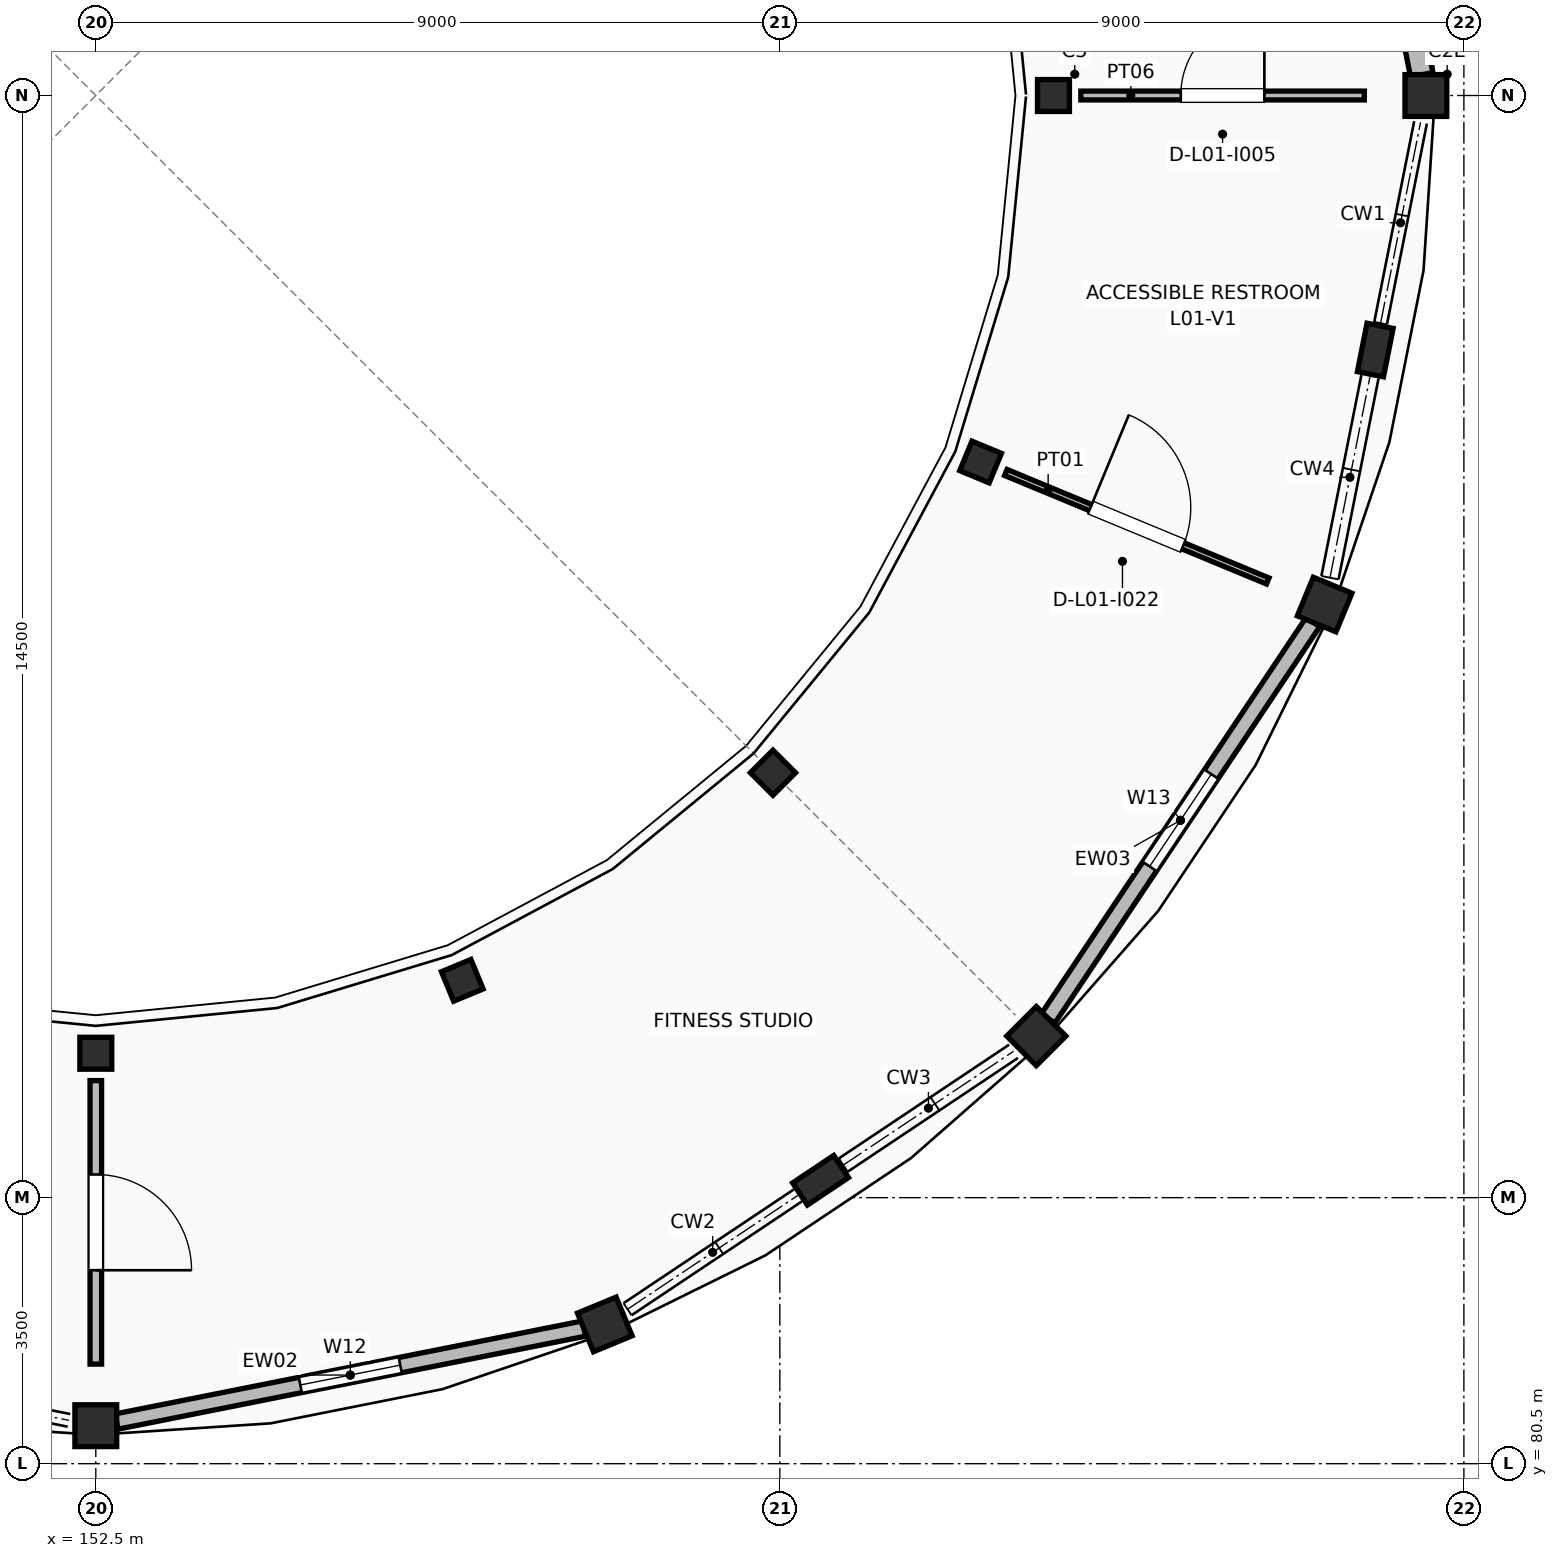
"""IFC4 building model, lengths in metres.
Left out: names, types, materials, properties, quantities, classifications, styles, units other than length and angle.
Written with IfcOpenShell. Run it as: python <this file> out.ifc"""

import sys

from ifc_helpers import new_model, si_unit, direction, frame, frame_2d, origin, origin_2d, place, context, subcontext, project, spatial, rectangle, extrude, element, fill, save


model = new_model("IFC4")
c1 = context("Model", 3, precision=1e-05, world=origin(), true_north=direction((0.0, 1.0)))
c2 = subcontext(c1, "Body", "Model", "MODEL_VIEW")
j1 = project(units=[si_unit("LENGTHUNIT", "METRE"), si_unit("PLANEANGLEUNIT", "RADIAN")], contexts=[c1])
p1 = place(None, origin())
s1 = spatial("IfcSite", under=j1, at=p1, CompositionType="ELEMENT")
p2 = place(p1, origin())
s2 = spatial("IfcBuilding", under=s1, at=p2, CompositionType="ELEMENT")
p3 = place(p2, frame((0.0, 0.0, 4.42)))
s3 = spatial("IfcBuildingStorey", under=s2, at=p3, CompositionType="ELEMENT", Elevation=4.42)
p4 = place(p3, frame((165.1, 98.5, 0.0), z_axis=(0.0, 0.0, 1.0), x_axis=(1.0, 0.0, 0.0)))
e1 = element("IfcColumn", 1, at=p4, inside=s3, PredefinedType="COLUMN", context=c2, shape_type="SweptSolid", body=[
    extrude(rectangle(XDim=0.42, YDim=0.42, at=origin_2d()), origin(), (0.0, 0.0, 1.0), 3.74),
])
p5 = place(p3, frame((170.0, 98.5, 0.0), z_axis=(0.0, 0.0, 1.0), x_axis=(1.0, 0.0, 0.0)))
e2 = element("IfcColumn", 2, at=p5, inside=s3, PredefinedType="COLUMN", context=c2, shape_type="SweptSolid", body=[
    extrude(rectangle(XDim=0.55, YDim=0.55, at=origin_2d()), origin(), (0.0, 0.0, 1.0), 3.74),
])
p6 = place(p3, frame((152.5, 85.9, 0.0), z_axis=(0.0, 0.0, 1.0), x_axis=(0.0, -1.0, 0.0)))
e3 = element("IfcColumn", 3, at=p6, inside=s3, PredefinedType="COLUMN", context=c2, shape_type="SweptSolid", body=[
    extrude(rectangle(XDim=0.42, YDim=0.42, at=origin_2d()), origin(), (0.0, 0.0, 1.0), 3.74),
])
p7 = place(p3, frame((152.5, 81.0, 0.0), z_axis=(0.0, 0.0, 1.0), x_axis=(0.0, -1.0, 0.0)))
e4 = element("IfcColumn", 4, at=p7, inside=s3, PredefinedType="COLUMN", context=c2, shape_type="SweptSolid", body=[
    extrude(rectangle(XDim=0.55, YDim=0.55, at=origin_2d()), origin(), (0.0, 0.0, 1.0), 3.74),
])
p8 = place(p3, frame((157.322, 86.859, 0.0), z_axis=(0.0, 0.0, 1.0), x_axis=(0.382683432365, -0.923879532511, 0.0)))
e5 = element("IfcColumn", 5, at=p8, inside=s3, PredefinedType="COLUMN", context=c2, shape_type="SweptSolid", body=[
    extrude(rectangle(XDim=0.42, YDim=0.42, at=origin_2d()), origin(), (0.0, 0.0, 1.0), 3.74),
])
p9 = place(p3, frame((159.197, 82.332, 0.0), z_axis=(0.0, 0.0, 1.0), x_axis=(0.382683432365, -0.923879532511, 0.0)))
e6 = element("IfcColumn", 6, at=p9, inside=s3, PredefinedType="COLUMN", context=c2, shape_type="SweptSolid", body=[
    extrude(rectangle(XDim=0.55, YDim=0.55, at=origin_2d()), origin(), (0.0, 0.0, 1.0), 3.74),
])
p10 = place(p3, frame((161.409, 89.591, 0.0), z_axis=(0.0, 0.0, 1.0), x_axis=(0.707106781187, -0.707106781187, 0.0)))
e7 = element("IfcColumn", 7, at=p10, inside=s3, PredefinedType="COLUMN", context=c2, shape_type="SweptSolid", body=[
    extrude(rectangle(XDim=0.42, YDim=0.42, at=origin_2d()), origin(), (0.0, 0.0, 1.0), 3.74),
])
p11 = place(p3, frame((164.874, 86.126, 0.0), z_axis=(0.0, 0.0, 1.0), x_axis=(0.707106781187, -0.707106781187, 0.0)))
e8 = element("IfcColumn", 8, at=p11, inside=s3, PredefinedType="COLUMN", context=c2, shape_type="SweptSolid", body=[
    extrude(rectangle(XDim=0.55, YDim=0.55, at=origin_2d()), origin(), (0.0, 0.0, 1.0), 3.74),
])
p12 = place(p3, frame((164.141, 93.678, 0.0), z_axis=(0.0, 0.0, 1.0), x_axis=(0.923879532511, -0.382683432365, 0.0)))
e9 = element("IfcColumn", 9, at=p12, inside=s3, PredefinedType="COLUMN", context=c2, shape_type="SweptSolid", body=[
    extrude(rectangle(XDim=0.42, YDim=0.42, at=origin_2d()), origin(), (0.0, 0.0, 1.0), 3.74),
])
p13 = place(p3, frame((168.668, 91.803, 0.0), z_axis=(0.0, 0.0, 1.0), x_axis=(0.923879532511, -0.382683432365, 0.0)))
e10 = element("IfcColumn", 10, at=p13, inside=s3, PredefinedType="COLUMN", context=c2, shape_type="SweptSolid", body=[
    extrude(rectangle(XDim=0.55, YDim=0.55, at=origin_2d()), origin(), (0.0, 0.0, 1.0), 3.74),
])
for number, where, z_axis, x_axis in (
    (11, (162.036, 84.229, 0.0), (0.0, 0.0, 1.0), (0.556, -0.831, 0.0)),
    (12, (169.334, 95.152, 0.0), (0.0, 0.0, 1.0), (0.981, -0.195, 0.0)),
):
    element("IfcColumn", number, at=place(p3, frame(where, z_axis=z_axis, x_axis=x_axis)), inside=s3, PredefinedType="PILASTER", context=c2, shape_type="SweptSolid", body=[
        extrude(rectangle(XDim=0.35, YDim=0.65, at=origin_2d()), origin(), (0.0, 0.0, 1.0), 3.74),
    ])
p14 = place(p3, frame((169.946, 98.773, 0.0), z_axis=(0.0, 0.0, 1.0), x_axis=(-0.195090512195, 0.980785242574, 0.0)))
e13 = element("IfcWall", 13, at=p14, inside=s3, PredefinedType="STANDARD", context=c2, shape_type="SweptSolid", body=[
    extrude(rectangle(XDim=6.272, YDim=0.3, at=frame_2d((3.136, 0.0))), origin(), (0.0, 0.0, 1.0), 2.78),
])
p15 = place(p14, frame((2.526, 0.0, 0.95)))
e14 = element("IfcOpeningElement", 14, at=p15, cuts=e13, PredefinedType="OPENING", context=c2, shape_type="SweptSolid", body=[
    extrude(rectangle(XDim=1.22, YDim=1.3, at=frame_2d((0.61, 0.65))), frame((0.0, 0.16, 0.0), z_axis=(0.0, -1.0, 0.0), x_axis=(1.0, 0.0, 0.0)), (0.0, 0.0, 1.0), 0.32),
])
p16 = place(p3, frame((152.773, 81.054, 0.0), z_axis=(0.0, 0.0, 1.0), x_axis=(0.980785242574, 0.195090512195, 0.0)))
e15 = element("IfcWall", 15, at=p16, inside=s3, PredefinedType="STANDARD", context=c2, shape_type="SweptSolid", body=[
    extrude(rectangle(XDim=6.272, YDim=0.204, at=frame_2d((3.136, 0.0))), origin(), (0.0, 0.0, 1.0), 2.78),
])
p17 = place(p16, frame((2.466, 0.0, 0.95)))
e16 = element("IfcOpeningElement", 16, at=p17, cuts=e15, PredefinedType="OPENING", context=c2, shape_type="SweptSolid", body=[
    extrude(rectangle(XDim=1.34, YDim=1.6, at=frame_2d((0.67, 0.8))), frame((0.0, 0.112, 0.0), z_axis=(0.0, -1.0, 0.0), x_axis=(1.0, 0.0, 0.0)), (0.0, 0.0, 1.0), 0.224),
])
p18 = place(p3, frame((165.029, 86.357, 0.0), z_axis=(0.0, 0.0, 1.0), x_axis=(0.555571204893, 0.831468962917, 0.0)))
e17 = element("IfcWall", 17, at=p18, inside=s3, PredefinedType="STANDARD", context=c2, shape_type="SweptSolid", body=[
    extrude(rectangle(XDim=6.272, YDim=0.216, at=frame_2d((3.136, 0.0))), origin(), (0.0, 0.0, 1.0), 2.78),
])
p19 = place(p18, frame((2.406, 0.0, 0.95)))
e18 = element("IfcOpeningElement", 18, at=p19, cuts=e17, PredefinedType="OPENING", context=c2, shape_type="SweptSolid", body=[
    extrude(rectangle(XDim=1.46, YDim=1.15, at=frame_2d((0.73, 0.575))), frame((0.0, 0.118, 0.0), z_axis=(0.0, -1.0, 0.0), x_axis=(1.0, 0.0, 0.0)), (0.0, 0.0, 1.0), 0.236),
])
p20 = place(p3, frame((165.46, 98.5, 0.0), z_axis=(0.0, 0.0, 1.0), x_axis=(1.0, 0.0, 0.0)))
e19 = element("IfcWall", 19, at=p20, inside=s3, PredefinedType="PARTITIONING", context=c2, shape_type="SweptSolid", body=[
    extrude(rectangle(XDim=3.73, YDim=0.116, at=frame_2d((1.865, 0.0))), origin(), (0.0, 0.0, 1.0), 2.75),
])
p21 = place(p20, frame((1.315, 0.0, 0.0)))
e20 = element("IfcOpeningElement", 20, at=p21, cuts=e19, PredefinedType="OPENING", context=c2, shape_type="SweptSolid", body=[
    extrude(rectangle(XDim=1.1, YDim=2.12, at=frame_2d((0.55, 1.06))), frame((0.0, 0.068, 0.0), z_axis=(0.0, -1.0, 0.0), x_axis=(1.0, 0.0, 0.0)), (0.0, 0.0, 1.0), 0.136),
])
p22 = place(p3, frame((152.5, 85.54, 0.0), z_axis=(0.0, 0.0, 1.0), x_axis=(0.0, -1.0, 0.0)))
e21 = element("IfcWall", 21, at=p22, inside=s3, PredefinedType="PARTITIONING", context=c2, shape_type="SweptSolid", body=[
    extrude(rectangle(XDim=3.73, YDim=0.152, at=frame_2d((1.865, 0.0))), origin(), (0.0, 0.0, 1.0), 2.75),
])
p23 = place(p22, frame((1.235, 0.0, 0.0)))
e22 = element("IfcOpeningElement", 22, at=p23, cuts=e21, PredefinedType="OPENING", context=c2, shape_type="SweptSolid", body=[
    extrude(rectangle(XDim=1.26, YDim=2.24, at=frame_2d((0.63, 1.12))), frame((0.0, 0.086, 0.0), z_axis=(0.0, -1.0, 0.0), x_axis=(1.0, 0.0, 0.0)), (0.0, 0.0, 1.0), 0.172),
])
p24 = place(p3, frame((164.473, 93.541, 0.0), z_axis=(0.0, 0.0, 1.0), x_axis=(0.923870841209, -0.38270441435, 0.0)))
e23 = element("IfcWall", 23, at=p24, inside=s3, PredefinedType="PARTITIONING", context=c2, shape_type="SweptSolid", body=[
    extrude(rectangle(XDim=3.73, YDim=0.086, at=frame_2d((1.865, 0.0))), origin(), (0.0, 0.0, 1.0), 2.75),
])
p25 = place(p24, frame((1.205, 0.0, 0.0)))
e24 = element("IfcOpeningElement", 24, at=p25, cuts=e23, PredefinedType="OPENING", context=c2, shape_type="SweptSolid", body=[
    extrude(rectangle(XDim=1.32, YDim=2.18, at=frame_2d((0.66, 1.09))), frame((0.0, 0.053, 0.0), z_axis=(0.0, -1.0, 0.0), x_axis=(1.0, 0.0, 0.0)), (0.0, 0.0, 1.0), 0.106),
])
p26 = place(p17, origin())
e25 = element("IfcWindow", 25, at=p26, inside=s3, PartitioningType="SINGLE_PANEL", PredefinedType="WINDOW", context=c2, shape_type="SweptSolid", body=[
    extrude(rectangle(XDim=1.34, YDim=1.6, at=frame_2d((0.67, 0.8))), frame((0.0, 0.03, 0.0), z_axis=(0.0, -1.0, 0.0), x_axis=(1.0, 0.0, 0.0)), (0.0, 0.0, 1.0), 0.06),
])
fill(e16, e25)
p27 = place(p19, origin())
e26 = element("IfcWindow", 26, at=p27, inside=s3, PartitioningType="SINGLE_PANEL", PredefinedType="WINDOW", context=c2, shape_type="SweptSolid", body=[
    extrude(rectangle(XDim=1.46, YDim=1.15, at=frame_2d((0.73, 0.575))), frame((0.0, 0.03, 0.0), z_axis=(0.0, -1.0, 0.0), x_axis=(1.0, 0.0, 0.0)), (0.0, 0.0, 1.0), 0.06),
])
fill(e18, e26)
p28 = place(p21, frame((1.1, 0.0, 0.0), z_axis=(0.0, 0.0, 1.0), x_axis=(-1.0, 0.0, 0.0)))
e27 = element("IfcDoor", 27, at=p28, inside=s3, OperationType="SINGLE_SWING_RIGHT", PredefinedType="DOOR", context=c2, shape_type="SweptSolid", body=[
    extrude(rectangle(XDim=1.1, YDim=2.12, at=frame_2d((0.55, 1.06))), frame((0.0, 0.025, 0.0), z_axis=(0.0, -1.0, 0.0), x_axis=(1.0, 0.0, 0.0)), (0.0, 0.0, 1.0), 0.05),
])
fill(e20, e27)
p29 = place(p23, frame((1.26, 0.0, 0.0), z_axis=(0.0, 0.0, 1.0), x_axis=(-1.0, 0.0, 0.0)))
e28 = element("IfcDoor", 28, at=p29, inside=s3, OperationType="SINGLE_SWING_RIGHT", PredefinedType="DOOR", context=c2, shape_type="SweptSolid", body=[
    extrude(rectangle(XDim=1.26, YDim=2.24, at=frame_2d((0.63, 1.12))), frame((0.0, 0.025, 0.0), z_axis=(0.0, -1.0, 0.0), x_axis=(1.0, 0.0, 0.0)), (0.0, 0.0, 1.0), 0.05),
])
fill(e22, e28)
p30 = place(p25, origin())
e29 = element("IfcDoor", 29, at=p30, inside=s3, OperationType="SINGLE_SWING_LEFT", PredefinedType="DOOR", context=c2, shape_type="SweptSolid", body=[
    extrude(rectangle(XDim=1.32, YDim=2.18, at=frame_2d((0.66, 1.09))), frame((0.0, 0.025, 0.0), z_axis=(0.0, -1.0, 0.0), x_axis=(1.0, 0.0, 0.0)), (0.0, 0.0, 1.0), 0.05),
])
fill(e24, e29)
save(model, sys.argv[1])
